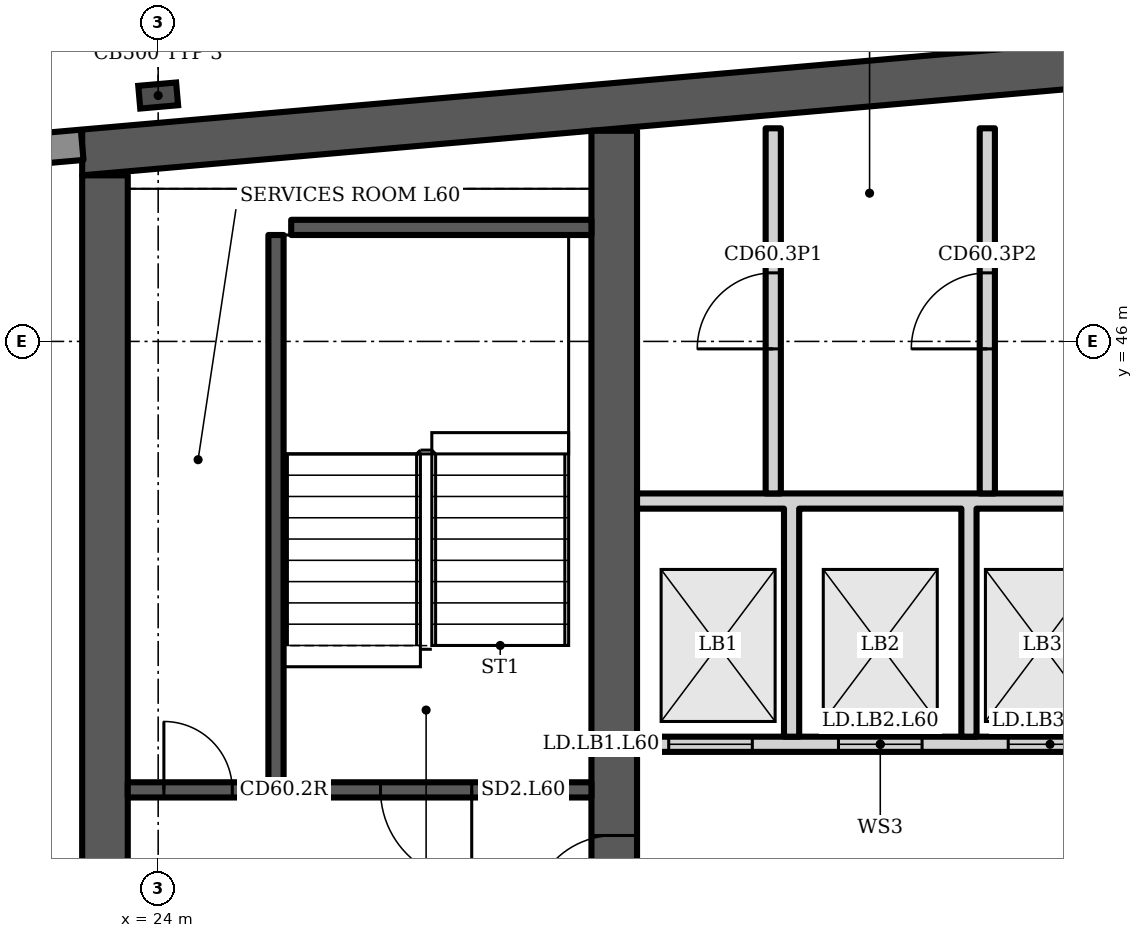
"""IFC4 building model, lengths in metres.
Left out: names, types, materials, properties, quantities, classifications, styles, units other than length and angle.
Written with IfcOpenShell. Run it as: python <this file> out.ifc"""

import sys

from ifc_helpers import new_model, si_unit, direction, frame, frame_2d, origin, origin_2d, place, context, subcontext, project, spatial, polyline, rectangle, i_section, outline, extrude, element, fill, save


model = new_model("IFC4")
c1 = context("Model", 3, precision=1e-05, world=origin(), true_north=direction((0.0, 1.0)))
c2 = subcontext(c1, "Body", "Model", "MODEL_VIEW")
j1 = project(units=[si_unit("LENGTHUNIT", "METRE"), si_unit("PLANEANGLEUNIT", "RADIAN")], contexts=[c1])
p1 = place(None, origin())
s1 = spatial("IfcSite", under=j1, at=p1, CompositionType="ELEMENT")
p2 = place(p1, origin())
s2 = spatial("IfcBuilding", under=s1, at=p2, CompositionType="ELEMENT")
p3 = place(p2, frame((0.0, 0.0, 239.5)))
s3 = spatial("IfcBuildingStorey", under=s2, at=p3, CompositionType="ELEMENT", Elevation=239.5)
p4 = place(p3, origin())
e1 = element("IfcWall", 1, at=p4, inside=s3, PredefinedType="SHEAR", context=c2, shape_type="SweptSolid", body=[
    extrude(outline(polyline([(23.0, 48.185), (40.5, 49.716), (58.0, 48.185), (58.0, 48.787), (40.5, 50.318), (23.0, 48.787), (23.0, 48.185)])), origin(), (0.0, 0.0, 1.0), 3.6),
])
p5 = place(p3, frame((23.3, 34.6, 0.0), z_axis=(0.0, 0.0, 1.0), x_axis=(0.0, 1.0, 0.0)))
e2 = element("IfcWall", 2, at=p5, inside=s3, PredefinedType="SHEAR", context=c2, shape_type="SweptSolid", body=[
    extrude(rectangle(XDim=13.585, YDim=0.6, at=frame_2d((6.792, 0.0))), origin(), (0.0, 0.0, 1.0), 3.6),
])
p6 = place(p3, frame((30.0, 34.6, 0.0), z_axis=(0.0, 0.0, 1.0), x_axis=(0.0, 1.0, 0.0)))
e3 = element("IfcWall", 3, at=p6, inside=s3, PredefinedType="SHEAR", context=c2, shape_type="SweptSolid", body=[
    extrude(rectangle(XDim=14.171, YDim=0.6, at=frame_2d((7.085, 0.0))), origin(), (0.0, 0.0, 1.0), 3.6),
])
p7 = place(p6, frame((3.8, 0.0, 0.0)))
e4 = element("IfcOpeningElement", 4, at=p7, cuts=e3, PredefinedType="OPENING", context=c2, shape_type="SweptSolid", body=[
    extrude(rectangle(XDim=1.1, YDim=2.1, at=frame_2d((0.55, 1.05))), frame((0.0, 0.31, 0.0), z_axis=(0.0, -1.0, 0.0), x_axis=(1.0, 0.0, 0.0)), (0.0, 0.0, 1.0), 0.62),
])
p8 = place(p3, frame((24.0, 49.235, 0.0), z_axis=(0.0, 0.0, 1.0), x_axis=(-0.087156, 0.996197, 0.0)))
e5 = element("IfcColumn", 5, at=p8, inside=s3, PredefinedType="COLUMN", context=c2, shape_type="SweptSolid", body=[
    extrude(i_section(OverallWidth=0.3, OverallDepth=0.5, WebThickness=0.014, FlangeThickness=0.028, FilletRadius=0.027, at=origin_2d()), origin(), (0.0, 0.0, 1.0), 3.6),
])
p9 = place(p3, frame((23.0, 48.587, 0.0), z_axis=(0.0, 0.0, 1.0), x_axis=(-0.996194, -0.087168, 0.0)))
e6 = element("IfcWall", 6, at=p9, inside=s3, PredefinedType="SOLIDWALL", context=c2, shape_type="SweptSolid", body=[
    extrude(rectangle(XDim=2.994, YDim=0.4, at=frame_2d((1.497, 0.0))), origin(), (0.0, 0.0, 1.0), 3.2),
])
p10 = place(p3, frame((23.6, 40.1, 0.0), z_axis=(0.0, 0.0, 1.0), x_axis=(1.0, 0.0, 0.0)))
e7 = element("IfcWall", 7, at=p10, inside=s3, PredefinedType="SHEAR", context=c2, shape_type="SweptSolid", body=[
    extrude(rectangle(XDim=6.1, YDim=0.2, at=frame_2d((3.05, 0.0))), origin(), (0.0, 0.0, 1.0), 3.2),
])
p11 = place(p10, frame((3.325, 0.0, 0.0)))
e8 = element("IfcOpeningElement", 8, at=p11, cuts=e7, PredefinedType="OPENING", context=c2, shape_type="SweptSolid", body=[
    extrude(rectangle(XDim=1.2, YDim=2.1, at=frame_2d((0.6, 1.05))), frame((0.0, 0.11, 0.0), z_axis=(0.0, -1.0, 0.0), x_axis=(1.0, 0.0, 0.0)), (0.0, 0.0, 1.0), 0.22),
])
p12 = place(p10, frame((0.475, 0.0, 0.0)))
e9 = element("IfcOpeningElement", 9, at=p12, cuts=e7, PredefinedType="OPENING", context=c2, shape_type="SweptSolid", body=[
    extrude(rectangle(XDim=0.9, YDim=2.1, at=frame_2d((0.45, 1.05))), frame((0.0, 0.11, 0.0), z_axis=(0.0, -1.0, 0.0), x_axis=(1.0, 0.0, 0.0)), (0.0, 0.0, 1.0), 0.22),
])
p13 = place(p3, frame((25.55, 40.2, 0.0), z_axis=(0.0, 0.0, 1.0), x_axis=(0.0, 1.0, 0.0)))
e10 = element("IfcWall", 10, at=p13, inside=s3, PredefinedType="SHEAR", context=c2, shape_type="SweptSolid", body=[
    extrude(rectangle(XDim=7.2, YDim=0.2, at=frame_2d((3.6, 0.0))), origin(), (0.0, 0.0, 1.0), 3.2),
])
p14 = place(p3, frame((25.75, 47.5, 0.0), z_axis=(0.0, 0.0, 1.0), x_axis=(1.0, 0.0, 0.0)))
e11 = element("IfcWall", 11, at=p14, inside=s3, PredefinedType="SHEAR", context=c2, shape_type="SweptSolid", body=[
    extrude(rectangle(XDim=3.95, YDim=0.2, at=frame_2d((1.975, 0.0))), origin(), (0.0, 0.0, 1.0), 3.2),
])
p15 = place(p3, frame((30.3, 40.7, 0.0), z_axis=(0.0, 0.0, 1.0), x_axis=(1.0, 0.0, 0.0)))
e12 = element("IfcWall", 12, at=p15, inside=s3, PredefinedType="PARTITIONING", context=c2, shape_type="SweptSolid", body=[
    extrude(rectangle(XDim=6.4, YDim=0.2, at=frame_2d((3.2, 0.0))), origin(), (0.0, 0.0, 1.0), 3.2),
])
p16 = place(p15, frame((0.417, 0.0, 0.0)))
e13 = element("IfcOpeningElement", 13, at=p16, cuts=e12, PredefinedType="OPENING", context=c2, shape_type="SweptSolid", body=[
    extrude(rectangle(XDim=1.1, YDim=2.1, at=frame_2d((0.55, 1.05))), frame((0.0, 0.11, 0.0), z_axis=(0.0, -1.0, 0.0), x_axis=(1.0, 0.0, 0.0)), (0.0, 0.0, 1.0), 0.22),
])
p17 = place(p15, frame((2.65, 0.0, 0.0)))
e14 = element("IfcOpeningElement", 14, at=p17, cuts=e12, PredefinedType="OPENING", context=c2, shape_type="SweptSolid", body=[
    extrude(rectangle(XDim=1.1, YDim=2.1, at=frame_2d((0.55, 1.05))), frame((0.0, 0.11, 0.0), z_axis=(0.0, -1.0, 0.0), x_axis=(1.0, 0.0, 0.0)), (0.0, 0.0, 1.0), 0.22),
])
p18 = place(p15, frame((4.883, 0.0, 0.0)))
e15 = element("IfcOpeningElement", 15, at=p18, cuts=e12, PredefinedType="OPENING", context=c2, shape_type="SweptSolid", body=[
    extrude(rectangle(XDim=1.1, YDim=2.1, at=frame_2d((0.55, 1.05))), frame((0.0, 0.11, 0.0), z_axis=(0.0, -1.0, 0.0), x_axis=(1.0, 0.0, 0.0)), (0.0, 0.0, 1.0), 0.22),
])
p19 = place(p3, frame((0.0, 0.0, -0.0)))
e16 = element("IfcWall", 16, at=p19, inside=s3, PredefinedType="PARTITIONING", context=c2, shape_type="SweptSolid", body=[
    extrude(outline(polyline([(32.433, 40.8), (32.233, 40.8), (32.233, 43.8), (30.3, 43.8), (30.3, 44.0), (36.7, 44.0), (36.7, 43.8), (34.767, 43.8), (34.767, 40.8), (34.567, 40.8), (34.567, 43.8), (32.433, 43.8), (32.433, 40.8)])), origin(), (0.0, 0.0, 1.0), 3.2),
])
p20 = place(p3, frame((32.092, 44.0, 0.0), z_axis=(0.0, 0.0, 1.0), x_axis=(0.0, 1.0, 0.0)))
e17 = element("IfcWall", 17, at=p20, inside=s3, PredefinedType="PARTITIONING", context=c2, shape_type="SweptSolid", body=[
    extrude(rectangle(XDim=4.804, YDim=0.2, at=frame_2d((2.402, 0.0))), origin(), (0.0, 0.0, 1.0), 3.2),
])
p21 = place(p20, frame((1.902, 0.0, 0.0)))
e18 = element("IfcOpeningElement", 18, at=p21, cuts=e17, PredefinedType="OPENING", context=c2, shape_type="SweptSolid", body=[
    extrude(rectangle(XDim=1.0, YDim=2.1, at=frame_2d((0.5, 1.05))), frame((0.0, 0.11, 0.0), z_axis=(0.0, -1.0, 0.0), x_axis=(1.0, 0.0, 0.0)), (0.0, 0.0, 1.0), 0.22),
])
p22 = place(p3, frame((34.908, 44.0, 0.0), z_axis=(0.0, 0.0, 1.0), x_axis=(0.0, 1.0, 0.0)))
e19 = element("IfcWall", 19, at=p22, inside=s3, PredefinedType="PARTITIONING", context=c2, shape_type="SweptSolid", body=[
    extrude(rectangle(XDim=4.804, YDim=0.2, at=frame_2d((2.402, 0.0))), origin(), (0.0, 0.0, 1.0), 3.2),
])
p23 = place(p22, frame((1.902, 0.0, 0.0)))
e20 = element("IfcOpeningElement", 20, at=p23, cuts=e19, PredefinedType="OPENING", context=c2, shape_type="SweptSolid", body=[
    extrude(rectangle(XDim=1.0, YDim=2.1, at=frame_2d((0.5, 1.05))), frame((0.0, 0.11, 0.0), z_axis=(0.0, -1.0, 0.0), x_axis=(1.0, 0.0, 0.0)), (0.0, 0.0, 1.0), 0.22),
])
p24 = place(p11, origin())
e21 = element("IfcDoor", 21, at=p24, inside=s3, OperationType="SINGLE_SWING_RIGHT", PredefinedType="DOOR", context=c2, shape_type="SweptSolid", body=[
    extrude(rectangle(XDim=1.2, YDim=2.1, at=frame_2d((0.6, 1.05))), frame((0.0, 0.025, 0.0), z_axis=(0.0, -1.0, 0.0), x_axis=(1.0, 0.0, 0.0)), (0.0, 0.0, 1.0), 0.05),
])
fill(e8, e21)
p25 = place(p12, origin())
e22 = element("IfcDoor", 22, at=p25, inside=s3, OperationType="SINGLE_SWING_LEFT", PredefinedType="DOOR", context=c2, shape_type="SweptSolid", body=[
    extrude(rectangle(XDim=0.9, YDim=2.1, at=frame_2d((0.45, 1.05))), frame((0.0, 0.025, 0.0), z_axis=(0.0, -1.0, 0.0), x_axis=(1.0, 0.0, 0.0)), (0.0, 0.0, 1.0), 0.05),
])
fill(e9, e22)
p26 = place(p16, origin())
e23 = element("IfcDoor", 23, at=p26, inside=s3, OperationType="DOUBLE_DOOR_SLIDING", PredefinedType="DOOR", context=c2, shape_type="SweptSolid", body=[
    extrude(rectangle(XDim=1.1, YDim=2.1, at=frame_2d((0.55, 1.05))), frame((0.0, 0.025, 0.0), z_axis=(0.0, -1.0, 0.0), x_axis=(1.0, 0.0, 0.0)), (0.0, 0.0, 1.0), 0.05),
])
fill(e13, e23)
p27 = place(p17, origin())
e24 = element("IfcDoor", 24, at=p27, inside=s3, OperationType="DOUBLE_DOOR_SLIDING", PredefinedType="DOOR", context=c2, shape_type="SweptSolid", body=[
    extrude(rectangle(XDim=1.1, YDim=2.1, at=frame_2d((0.55, 1.05))), frame((0.0, 0.025, 0.0), z_axis=(0.0, -1.0, 0.0), x_axis=(1.0, 0.0, 0.0)), (0.0, 0.0, 1.0), 0.05),
])
fill(e14, e24)
p28 = place(p18, origin())
e25 = element("IfcDoor", 25, at=p28, inside=s3, OperationType="DOUBLE_DOOR_SLIDING", PredefinedType="DOOR", context=c2, shape_type="SweptSolid", body=[
    extrude(rectangle(XDim=1.1, YDim=2.1, at=frame_2d((0.55, 1.05))), frame((0.0, 0.025, 0.0), z_axis=(0.0, -1.0, 0.0), x_axis=(1.0, 0.0, 0.0)), (0.0, 0.0, 1.0), 0.05),
])
fill(e15, e25)
p29 = place(p21, origin())
e26 = element("IfcDoor", 26, at=p29, inside=s3, OperationType="SINGLE_SWING_LEFT", PredefinedType="DOOR", context=c2, shape_type="SweptSolid", body=[
    extrude(rectangle(XDim=1.0, YDim=2.1, at=frame_2d((0.5, 1.05))), frame((0.0, 0.025, 0.0), z_axis=(0.0, -1.0, 0.0), x_axis=(1.0, 0.0, 0.0)), (0.0, 0.0, 1.0), 0.05),
])
fill(e18, e26)
p30 = place(p23, origin())
e27 = element("IfcDoor", 27, at=p30, inside=s3, OperationType="SINGLE_SWING_LEFT", PredefinedType="DOOR", context=c2, shape_type="SweptSolid", body=[
    extrude(rectangle(XDim=1.0, YDim=2.1, at=frame_2d((0.5, 1.05))), frame((0.0, 0.025, 0.0), z_axis=(0.0, -1.0, 0.0), x_axis=(1.0, 0.0, 0.0)), (0.0, 0.0, 1.0), 0.05),
])
fill(e20, e27)
p31 = place(p7, origin())
e28 = element("IfcDoor", 28, at=p31, inside=s3, OperationType="SINGLE_SWING_LEFT", PredefinedType="DOOR", context=c2, shape_type="SweptSolid", body=[
    extrude(rectangle(XDim=1.1, YDim=2.1, at=frame_2d((0.55, 1.05))), frame((0.0, 0.025, 0.0), z_axis=(0.0, -1.0, 0.0), x_axis=(1.0, 0.0, 0.0)), (0.0, 0.0, 1.0), 0.05),
])
fill(e4, e28)
save(model, sys.argv[1])
